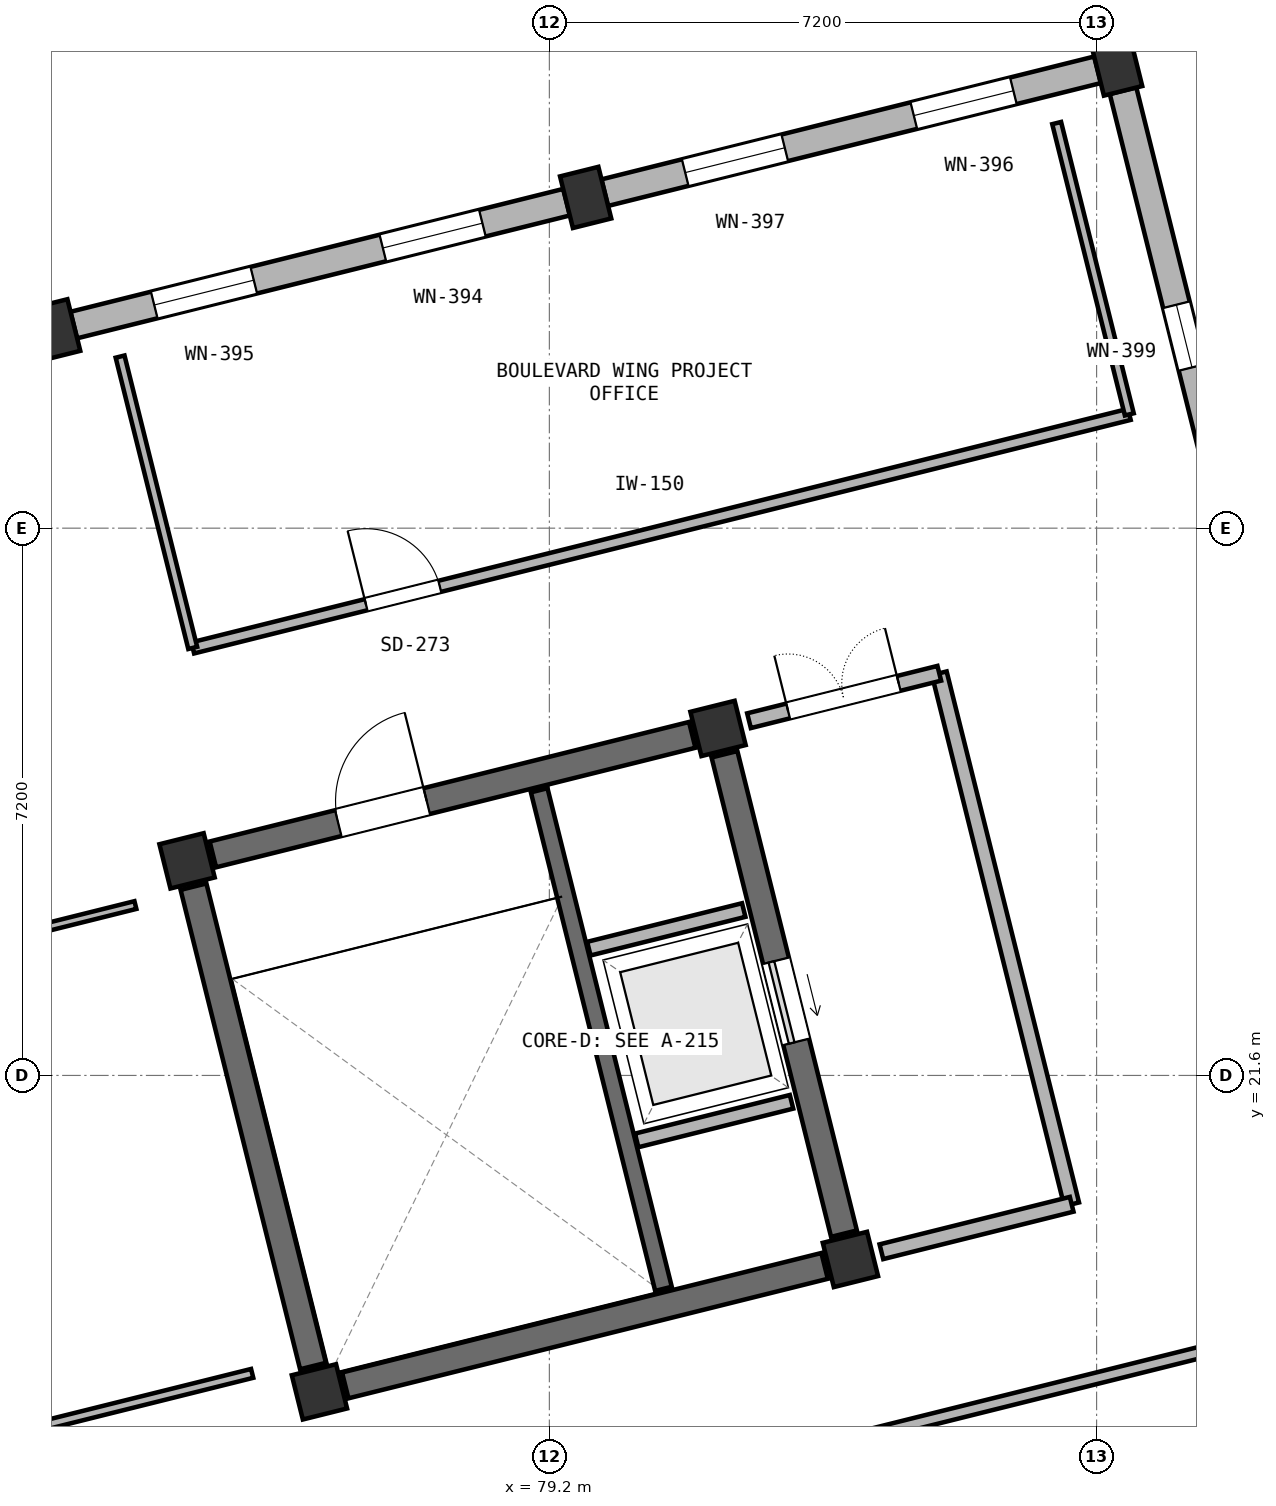
"""IFC4 building model, lengths in metres.
Left out: names, types, materials, properties, quantities, classifications, styles, units other than length and angle.
Written with IfcOpenShell. Run it as: python <this file> out.ifc"""

import sys

from ifc_helpers import new_model, si_unit, direction, frame, frame_2d, origin, origin_2d, place, context, subcontext, project, spatial, rectangle, extrude, element, fill, save


model = new_model("IFC4")
c1 = context("Model", 3, precision=1e-05, world=origin(), true_north=direction((0.0, 1.0)))
c2 = subcontext(c1, "Body", "Model", "MODEL_VIEW")
j1 = project(units=[si_unit("LENGTHUNIT", "METRE"), si_unit("PLANEANGLEUNIT", "RADIAN")], contexts=[c1])
p1 = place(None, origin())
s1 = spatial("IfcSite", under=j1, at=p1, CompositionType="ELEMENT")
p2 = place(p1, origin())
s2 = spatial("IfcBuilding", under=s1, at=p2, CompositionType="ELEMENT")
p3 = place(p2, frame((0.0, 0.0, 22.5)))
s3 = spatial("IfcBuildingStorey", under=s2, at=p3, CompositionType="ELEMENT", Elevation=22.5)
for number, where, z_axis, x_axis in (
    (1, (76.175, 17.437, 0.0), (0.0, 0.0, 1.0), (0.97, 0.242, 0.0)),
    (2, (74.433, 24.423, 0.0), (0.0, 0.0, 1.0), (0.97, 0.242, 0.0)),
):
    element("IfcColumn", number, at=place(p3, frame(where, z_axis=z_axis, x_axis=x_axis)), inside=s3, PredefinedType="COLUMN", context=c2, shape_type="SweptSolid", body=[
        extrude(rectangle(XDim=0.6, YDim=0.6, at=origin_2d()), origin(), (0.0, 0.0, 1.0), 3.9),
    ])
p4 = place(p3, frame((72.691, 31.409, 0.0), z_axis=(0.0, 0.0, 1.0), x_axis=(0.970295726276, 0.2419218956, 0.0)))
e3 = element("IfcColumn", 3, at=p4, inside=s3, PredefinedType="COLUMN", context=c2, shape_type="SweptSolid", body=[
    extrude(rectangle(XDim=0.52, YDim=0.7, at=origin_2d()), origin(), (0.0, 0.0, 1.0), 3.9),
])
for number, where, z_axis, x_axis in (
    (4, (83.161, 19.179, 0.0), (0.0, 0.0, 1.0), (0.97, 0.242, 0.0)),
    (5, (81.419, 26.165, 0.0), (0.0, 0.0, 1.0), (0.97, 0.242, 0.0)),
):
    element("IfcColumn", number, at=place(p3, frame(where, z_axis=z_axis, x_axis=x_axis)), inside=s3, PredefinedType="COLUMN", context=c2, shape_type="SweptSolid", body=[
        extrude(rectangle(XDim=0.6, YDim=0.6, at=origin_2d()), origin(), (0.0, 0.0, 1.0), 3.9),
    ])
for number, where, z_axis, x_axis in (
    (6, (79.677, 33.151, 0.0), (0.0, 0.0, 1.0), (0.97, 0.242, 0.0)),
    (7, (86.664, 34.893, 0.0), (0.0, 0.0, 1.0), (0.97, 0.242, 0.0)),
):
    element("IfcColumn", number, at=place(p3, frame(where, z_axis=z_axis, x_axis=x_axis)), inside=s3, PredefinedType="COLUMN", context=c2, shape_type="SweptSolid", body=[
        extrude(rectangle(XDim=0.52, YDim=0.7, at=origin_2d()), origin(), (0.0, 0.0, 1.0), 3.9),
    ])
p5 = place(p3, frame((76.515, 17.522, 0.0), z_axis=(0.0, 0.0, 1.0), x_axis=(0.970294759049, 0.241925774902, 0.0)))
e8 = element("IfcWall", 8, at=p5, inside=s3, PredefinedType="SHEAR", context=c2, shape_type="SweptSolid", body=[
    extrude(rectangle(XDim=6.5, YDim=0.35, at=frame_2d((3.25, 0.0))), origin(), (0.0, 0.0, 1.0), 3.9),
])
p6 = place(p3, frame((83.076, 19.519, 0.0), z_axis=(0.0, 0.0, 1.0), x_axis=(-0.241925774902, 0.970294759049, 0.0)))
e9 = element("IfcWall", 9, at=p6, inside=s3, PredefinedType="SHEAR", context=c2, shape_type="SweptSolid", body=[
    extrude(rectangle(XDim=6.5, YDim=0.35, at=frame_2d((3.25, 0.0))), origin(), (0.0, 0.0, 1.0), 3.9),
])
p7 = place(p6, frame((2.6, 0.0, 0.0)))
e10 = element("IfcOpeningElement", 10, at=p7, cuts=e9, PredefinedType="OPENING", context=c2, shape_type="SweptSolid", body=[
    extrude(rectangle(XDim=1.1, YDim=2.2, at=frame_2d((0.55, 1.1))), frame((0.0, 0.185, 0.0), z_axis=(0.0, -1.0, 0.0), x_axis=(1.0, 0.0, 0.0)), (0.0, 0.0, 1.0), 0.37),
])
p8 = place(p3, frame((81.08, 26.081, 0.0), z_axis=(0.0, 0.0, 1.0), x_axis=(-0.970294759049, -0.241925774902, 0.0)))
e11 = element("IfcWall", 11, at=p8, inside=s3, PredefinedType="SHEAR", context=c2, shape_type="SweptSolid", body=[
    extrude(rectangle(XDim=6.5, YDim=0.35, at=frame_2d((3.25, 0.0))), origin(), (0.0, 0.0, 1.0), 3.9),
])
p9 = place(p8, frame((3.6, 0.0, 0.0)))
e12 = element("IfcOpeningElement", 12, at=p9, cuts=e11, PredefinedType="OPENING", context=c2, shape_type="SweptSolid", body=[
    extrude(rectangle(XDim=1.2, YDim=2.2, at=frame_2d((0.6, 1.1))), frame((0.0, 0.185, 0.0), z_axis=(0.0, -1.0, 0.0), x_axis=(1.0, 0.0, 0.0)), (0.0, 0.0, 1.0), 0.37),
])
p10 = place(p3, frame((74.518, 24.084, 0.0), z_axis=(0.0, 0.0, 1.0), x_axis=(0.241925774902, -0.970294759049, 0.0)))
e13 = element("IfcWall", 13, at=p10, inside=s3, PredefinedType="SHEAR", context=c2, shape_type="SweptSolid", body=[
    extrude(rectangle(XDim=6.5, YDim=0.35, at=frame_2d((3.25, 0.0))), origin(), (0.0, 0.0, 1.0), 3.9),
])
p11 = place(p3, frame((80.701, 18.792, 0.0), z_axis=(0.0, 0.0, 1.0), x_axis=(-0.241898249226, 0.970301621673, 0.0)))
e14 = element("IfcWall", 14, at=p11, inside=s3, PredefinedType="SHEAR", context=c2, shape_type="SweptSolid", body=[
    extrude(rectangle(XDim=6.76, YDim=0.225, at=frame_2d((3.38, 0.0))), origin(), (0.0, 0.0, 1.0), 3.9),
])
for number, where, z_axis, x_axis in (
    (15, (80.349, 20.745, 0.0), (0.0, 0.0, 1.0), (0.97, 0.242, 0.0)),
    (16, (79.72, 23.268, 0.0), (0.0, 0.0, 1.0), (0.97, 0.242, 0.0)),
):
    element("IfcWall", number, at=place(p3, frame(where, z_axis=z_axis, x_axis=x_axis)), inside=s3, PredefinedType="PARTITIONING", context=c2, shape_type="SweptSolid", body=[
        extrude(rectangle(XDim=2.1, YDim=0.185, at=frame_2d((1.05, 0.0))), origin(), (0.0, 0.0, 1.0), 3.9),
    ])
p12 = place(p3, frame((79.427, 33.089, 0.0), z_axis=(0.0, 0.0, 1.0), x_axis=(-0.970297004388, -0.241916769314, 0.0)))
e17 = element("IfcWall", 17, at=p12, inside=s3, PredefinedType="SOLIDWALL", context=c2, shape_type="SweptSolid", body=[
    extrude(rectangle(XDim=6.684, YDim=0.36, at=frame_2d((3.342, 0.0))), origin(), (0.0, 0.0, 1.0), 2.74),
])
p13 = place(p12, frame((1.142, 0.0, 0.65)))
e18 = element("IfcOpeningElement", 18, at=p13, cuts=e17, PredefinedType="OPENING", context=c2, shape_type="SweptSolid", body=[
    extrude(rectangle(XDim=1.35, YDim=1.94, at=frame_2d((0.675, 0.97))), frame((0.0, 0.19, 0.0), z_axis=(0.0, -1.0, 0.0), x_axis=(1.0, 0.0, 0.0)), (0.0, 0.0, 1.0), 0.38),
])
p14 = place(p12, frame((4.242, 0.0, 0.65)))
e19 = element("IfcOpeningElement", 19, at=p14, cuts=e17, PredefinedType="OPENING", context=c2, shape_type="SweptSolid", body=[
    extrude(rectangle(XDim=1.35, YDim=1.94, at=frame_2d((0.675, 0.97))), frame((0.0, 0.19, 0.0), z_axis=(0.0, -1.0, 0.0), x_axis=(1.0, 0.0, 0.0)), (0.0, 0.0, 1.0), 0.38),
])
p15 = place(p3, frame((86.413, 34.831, 0.0), z_axis=(0.0, 0.0, 1.0), x_axis=(-0.970297004388, -0.241916769314, 0.0)))
e20 = element("IfcWall", 20, at=p15, inside=s3, PredefinedType="SOLIDWALL", context=c2, shape_type="SweptSolid", body=[
    extrude(rectangle(XDim=6.684, YDim=0.36, at=frame_2d((3.342, 0.0))), origin(), (0.0, 0.0, 1.0), 2.74),
])
p16 = place(p15, frame((1.142, 0.0, 0.65)))
e21 = element("IfcOpeningElement", 21, at=p16, cuts=e20, PredefinedType="OPENING", context=c2, shape_type="SweptSolid", body=[
    extrude(rectangle(XDim=1.35, YDim=1.94, at=frame_2d((0.675, 0.97))), frame((0.0, 0.19, 0.0), z_axis=(0.0, -1.0, 0.0), x_axis=(1.0, 0.0, 0.0)), (0.0, 0.0, 1.0), 0.38),
])
p17 = place(p15, frame((4.242, 0.0, 0.65)))
e22 = element("IfcOpeningElement", 22, at=p17, cuts=e20, PredefinedType="OPENING", context=c2, shape_type="SweptSolid", body=[
    extrude(rectangle(XDim=1.35, YDim=1.94, at=frame_2d((0.675, 0.97))), frame((0.0, 0.19, 0.0), z_axis=(0.0, -1.0, 0.0), x_axis=(1.0, 0.0, 0.0)), (0.0, 0.0, 1.0), 0.38),
])
p18 = place(p3, frame((88.321, 28.245, 0.0), z_axis=(0.0, 0.0, 1.0), x_axis=(-0.241926152475, 0.970294664908, 0.0)))
e23 = element("IfcWall", 23, at=p18, inside=s3, PredefinedType="SOLIDWALL", context=c2, shape_type="SweptSolid", body=[
    extrude(rectangle(XDim=6.504, YDim=0.36, at=frame_2d((3.252, 0.0))), origin(), (0.0, 0.0, 1.0), 2.74),
])
p19 = place(p18, frame((2.752, 0.0, 0.7)))
e24 = element("IfcOpeningElement", 24, at=p19, cuts=e23, PredefinedType="OPENING", context=c2, shape_type="SweptSolid", body=[
    extrude(rectangle(XDim=0.85, YDim=1.89, at=frame_2d((0.425, 0.945))), frame((0.0, 0.19, 0.0), z_axis=(0.0, -1.0, 0.0), x_axis=(1.0, 0.0, 0.0)), (0.0, 0.0, 1.0), 0.38),
])
p20 = place(p3, frame((86.072, 19.905, 0.0), z_axis=(0.0, 0.0, 1.0), x_axis=(-0.241937193493, 0.970291911955, 0.0)))
e25 = element("IfcWall", 25, at=p20, inside=s3, PredefinedType="PARTITIONING", context=c2, shape_type="SweptSolid", body=[
    extrude(rectangle(XDim=7.2, YDim=0.2, at=frame_2d((3.6, 0.0))), origin(), (0.0, 0.0, 1.0), 2.78),
])
p21 = place(p3, frame((83.569, 19.281, 0.0), z_axis=(0.0, 0.0, 1.0), x_axis=(0.970287048366, 0.241956698135, 0.0)))
e26 = element("IfcWall", 26, at=p21, inside=s3, PredefinedType="PARTITIONING", context=c2, shape_type="SweptSolid", body=[
    extrude(rectangle(XDim=2.58, YDim=0.2, at=frame_2d((1.29, 0.0))), origin(), (0.0, 0.0, 1.0), 2.78),
])
p22 = place(p3, frame((84.33, 26.891, 0.0), z_axis=(0.0, 0.0, 1.0), x_axis=(-0.970309259708, -0.2418676095, 0.0)))
e27 = element("IfcWall", 27, at=p22, inside=s3, PredefinedType="PARTITIONING", context=c2, shape_type="SweptSolid", body=[
    extrude(rectangle(XDim=2.58, YDim=0.2, at=frame_2d((1.29, 0.0))), origin(), (0.0, 0.0, 1.0), 2.78),
])
p23 = place(p22, frame((0.55, 0.0, 0.0)))
e28 = element("IfcOpeningElement", 28, at=p23, cuts=e27, PredefinedType="OPENING", context=c2, shape_type="SweptSolid", body=[
    extrude(rectangle(XDim=1.5, YDim=2.2, at=frame_2d((0.75, 1.1))), frame((0.0, 0.11, 0.0), z_axis=(0.0, -1.0, 0.0), x_axis=(1.0, 0.0, 0.0)), (0.0, 0.0, 1.0), 0.22),
])
p24 = place(p3, frame((76.295, 15.097, 0.0), z_axis=(0.0, 0.0, 1.0), x_axis=(0.970295086625, 0.241924461086, 0.0)))
e29 = element("IfcWall", 29, at=p24, inside=s3, PredefinedType="PARTITIONING", context=c2, shape_type="SweptSolid", body=[
    extrude(rectangle(XDim=14.1, YDim=0.15, at=frame_2d((7.05, 0.0))), origin(), (0.0, 0.0, 1.0), 2.78),
])
p25 = place(p24, frame((1.95, 0.0, 0.0)))
e30 = element("IfcOpeningElement", 30, at=p25, cuts=e29, PredefinedType="OPENING", context=c2, shape_type="SweptSolid", body=[
    extrude(rectangle(XDim=1.0, YDim=2.2, at=frame_2d((0.5, 1.1))), frame((0.0, 0.085, 0.0), z_axis=(0.0, -1.0, 0.0), x_axis=(1.0, 0.0, 0.0)), (0.0, 0.0, 1.0), 0.17),
])
p26 = place(p3, frame((73.754, 23.842, 0.0), z_axis=(0.0, 0.0, 1.0), x_axis=(-0.970295954135, -0.241920981706, 0.0)))
e31 = element("IfcWall", 31, at=p26, inside=s3, PredefinedType="PARTITIONING", context=c2, shape_type="SweptSolid", body=[
    extrude(rectangle(XDim=18.6, YDim=0.105, at=frame_2d((9.3, 0.0))), origin(), (0.0, 0.0, 1.0), 2.78),
])
p27 = place(p26, frame((9.2, 0.0, 0.0)))
e32 = element("IfcOpeningElement", 32, at=p27, cuts=e31, PredefinedType="OPENING", context=c2, shape_type="SweptSolid", body=[
    extrude(rectangle(XDim=1.6, YDim=2.2, at=frame_2d((0.8, 1.1))), frame((0.0, 0.062, 0.0), z_axis=(0.0, -1.0, 0.0), x_axis=(1.0, 0.0, 0.0)), (0.0, 0.0, 1.0), 0.125),
])
p28 = place(p3, frame((57.242, 13.18, 0.0), z_axis=(0.0, 0.0, 1.0), x_axis=(0.970295185925, 0.24192406282, 0.0)))
e33 = element("IfcWall", 33, at=p28, inside=s3, PredefinedType="PARTITIONING", context=c2, shape_type="SweptSolid", body=[
    extrude(rectangle(XDim=18.6, YDim=0.12, at=frame_2d((9.3, 0.0))), origin(), (0.0, 0.0, 1.0), 2.78),
])
p29 = place(p3, frame((74.508, 27.225, 0.0), z_axis=(0.0, 0.0, 1.0), x_axis=(0.970298350757, 0.241911369139, 0.0)))
e34 = element("IfcWall", 34, at=p29, inside=s3, PredefinedType="PARTITIONING", context=c2, shape_type="SweptSolid", body=[
    extrude(rectangle(XDim=12.7, YDim=0.15, at=frame_2d((6.35, 0.0))), origin(), (0.0, 0.0, 1.0), 2.78),
])
p30 = place(p29, frame((2.35, 0.0, 0.0)))
e35 = element("IfcOpeningElement", 35, at=p30, cuts=e34, PredefinedType="OPENING", context=c2, shape_type="SweptSolid", body=[
    extrude(rectangle(XDim=1.0, YDim=2.15, at=frame_2d((0.5, 1.075))), frame((0.0, 0.085, 0.0), z_axis=(0.0, -1.0, 0.0), x_axis=(1.0, 0.0, 0.0)), (0.0, 0.0, 1.0), 0.17),
])
p31 = place(p3, frame((74.508, 27.225, 0.0), z_axis=(0.0, 0.0, 1.0), x_axis=(-0.241924747697, 0.970295015164, 0.0)))
e36 = element("IfcWall", 36, at=p31, inside=s3, PredefinedType="PARTITIONING", context=c2, shape_type="SweptSolid", body=[
    extrude(rectangle(XDim=3.95, YDim=0.12, at=frame_2d((1.975, 0.0))), origin(), (0.0, 0.0, 1.0), 2.78),
])
p32 = place(p3, frame((85.875, 34.13, 0.0), z_axis=(0.0, 0.0, 1.0), x_axis=(0.241910239337, -0.970298632434, 0.0)))
e37 = element("IfcWall", 37, at=p32, inside=s3, PredefinedType="PARTITIONING", context=c2, shape_type="SweptSolid", body=[
    extrude(rectangle(XDim=3.95, YDim=0.12, at=frame_2d((1.975, 0.0))), origin(), (0.0, 0.0, 1.0), 2.78),
])
p33 = place(p7, origin())
e38 = element("IfcDoor", 38, at=p33, inside=s3, OperationType="SLIDING_TO_LEFT", PredefinedType="DOOR", context=c2, shape_type="SweptSolid", body=[
    extrude(rectangle(XDim=1.1, YDim=2.2, at=frame_2d((0.55, 1.1))), frame((0.0, 0.025, 0.0), z_axis=(0.0, -1.0, 0.0), x_axis=(1.0, 0.0, 0.0)), (0.0, 0.0, 1.0), 0.05),
])
fill(e10, e38)
p34 = place(p13, origin())
e39 = element("IfcWindow", 39, at=p34, inside=s3, PartitioningType="DOUBLE_PANEL_VERTICAL", PredefinedType="WINDOW", context=c2, shape_type="SweptSolid", body=[
    extrude(rectangle(XDim=1.35, YDim=1.94, at=frame_2d((0.675, 0.97))), frame((0.0, 0.03, 0.0), z_axis=(0.0, -1.0, 0.0), x_axis=(1.0, 0.0, 0.0)), (0.0, 0.0, 1.0), 0.06),
])
fill(e18, e39)
p35 = place(p14, origin())
e40 = element("IfcWindow", 40, at=p35, inside=s3, PartitioningType="DOUBLE_PANEL_VERTICAL", PredefinedType="WINDOW", context=c2, shape_type="SweptSolid", body=[
    extrude(rectangle(XDim=1.35, YDim=1.94, at=frame_2d((0.675, 0.97))), frame((0.0, 0.03, 0.0), z_axis=(0.0, -1.0, 0.0), x_axis=(1.0, 0.0, 0.0)), (0.0, 0.0, 1.0), 0.06),
])
fill(e19, e40)
p36 = place(p16, origin())
e41 = element("IfcWindow", 41, at=p36, inside=s3, PartitioningType="DOUBLE_PANEL_VERTICAL", PredefinedType="WINDOW", context=c2, shape_type="SweptSolid", body=[
    extrude(rectangle(XDim=1.35, YDim=1.94, at=frame_2d((0.675, 0.97))), frame((0.0, 0.03, 0.0), z_axis=(0.0, -1.0, 0.0), x_axis=(1.0, 0.0, 0.0)), (0.0, 0.0, 1.0), 0.06),
])
fill(e21, e41)
p37 = place(p17, origin())
e42 = element("IfcWindow", 42, at=p37, inside=s3, PartitioningType="DOUBLE_PANEL_VERTICAL", PredefinedType="WINDOW", context=c2, shape_type="SweptSolid", body=[
    extrude(rectangle(XDim=1.35, YDim=1.94, at=frame_2d((0.675, 0.97))), frame((0.0, 0.03, 0.0), z_axis=(0.0, -1.0, 0.0), x_axis=(1.0, 0.0, 0.0)), (0.0, 0.0, 1.0), 0.06),
])
fill(e22, e42)
p38 = place(p19, origin())
e43 = element("IfcWindow", 43, at=p38, inside=s3, PartitioningType="SINGLE_PANEL", PredefinedType="WINDOW", context=c2, shape_type="SweptSolid", body=[
    extrude(rectangle(XDim=0.85, YDim=1.89, at=frame_2d((0.425, 0.945))), frame((0.0, 0.03, 0.0), z_axis=(0.0, -1.0, 0.0), x_axis=(1.0, 0.0, 0.0)), (0.0, 0.0, 1.0), 0.06),
])
fill(e24, e43)
p39 = place(p9, frame((1.2, 0.0, 0.0), z_axis=(0.0, 0.0, 1.0), x_axis=(-1.0, 0.0, 0.0)))
e44 = element("IfcDoor", 44, at=p39, inside=s3, OperationType="SINGLE_SWING_RIGHT", PredefinedType="DOOR", context=c2, shape_type="SweptSolid", body=[
    extrude(rectangle(XDim=1.2, YDim=2.2, at=frame_2d((0.6, 1.1))), frame((0.0, 0.025, 0.0), z_axis=(0.0, -1.0, 0.0), x_axis=(1.0, 0.0, 0.0)), (0.0, 0.0, 1.0), 0.05),
])
fill(e12, e44)
p40 = place(p23, frame((1.5, 0.0, 0.0), z_axis=(0.0, 0.0, 1.0), x_axis=(-1.0, 0.0, 0.0)))
e45 = element("IfcDoor", 45, at=p40, inside=s3, OperationType="DOUBLE_DOOR_SINGLE_SWING", PredefinedType="DOOR", context=c2, shape_type="SweptSolid", body=[
    extrude(rectangle(XDim=1.5, YDim=2.2, at=frame_2d((0.75, 1.1))), frame((0.0, 0.025, 0.0), z_axis=(0.0, -1.0, 0.0), x_axis=(1.0, 0.0, 0.0)), (0.0, 0.0, 1.0), 0.05),
])
fill(e28, e45)
p41 = place(p30, origin())
e46 = element("IfcDoor", 46, at=p41, inside=s3, OperationType="SINGLE_SWING_LEFT", PredefinedType="DOOR", context=c2, shape_type="SweptSolid", body=[
    extrude(rectangle(XDim=1.0, YDim=2.15, at=frame_2d((0.5, 1.075))), frame((0.0, 0.025, 0.0), z_axis=(0.0, -1.0, 0.0), x_axis=(1.0, 0.0, 0.0)), (0.0, 0.0, 1.0), 0.05),
])
fill(e35, e46)
save(model, sys.argv[1])
